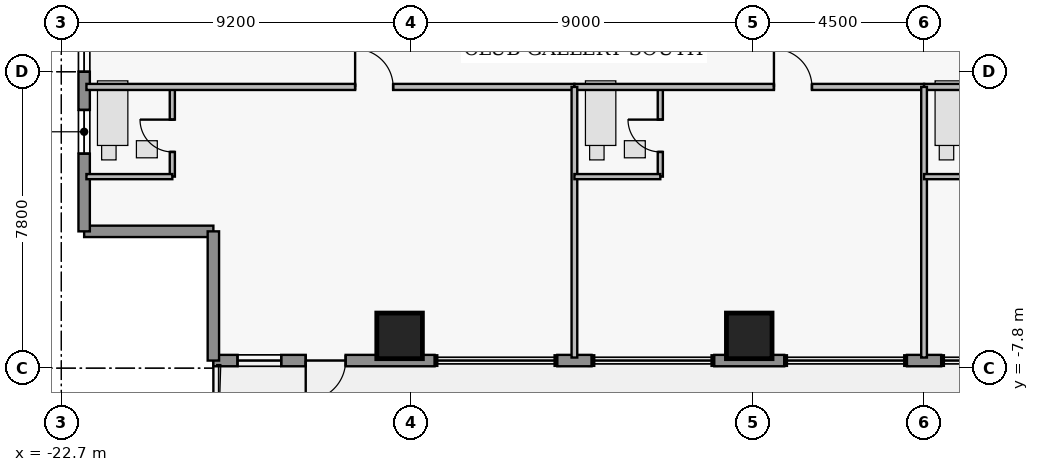
"""IFC4 building model, lengths in metres.
Left out: names, types, materials, properties, quantities, classifications, styles, units other than length and angle.
Written with IfcOpenShell. Run it as: python <this file> out.ifc"""

import sys

from ifc_helpers import new_model, si_unit, direction, frame, frame_2d, origin, origin_2d, place, context, subcontext, project, spatial, rectangle, extrude, element, fill, save


model = new_model("IFC4")
c1 = context("Model", 3, precision=1e-05, world=origin(), true_north=direction((0.0, 1.0)))
c2 = subcontext(c1, "Body", "Model", "MODEL_VIEW")
j1 = project(units=[si_unit("LENGTHUNIT", "METRE"), si_unit("PLANEANGLEUNIT", "RADIAN")], contexts=[c1])
p1 = place(None, origin())
s1 = spatial("IfcSite", under=j1, at=p1, CompositionType="ELEMENT")
p2 = place(p1, origin())
s2 = spatial("IfcBuilding", under=s1, at=p2, CompositionType="ELEMENT")
p3 = place(p2, frame((0.0, 0.0, 226.15)))
s3 = spatial("IfcBuildingStorey", under=s2, at=p3, CompositionType="ELEMENT", Elevation=226.15)
for number, where, z_axis, x_axis in (
    (1, (-13.8, -6.95, 0.0), (0.0, 0.0, 1.0), (1.0, 0.0, 0.0)),
    (2, (-4.6, -6.95, 0.0), (0.0, 0.0, 1.0), (1.0, 0.0, 0.0)),
):
    element("IfcColumn", number, at=place(p3, frame(where, z_axis=z_axis, x_axis=x_axis)), inside=s3, PredefinedType="COLUMN", context=c2, shape_type="SweptSolid", body=[
        extrude(rectangle(XDim=1.2, YDim=1.2, at=origin_2d()), origin(), (0.0, 0.0, 1.0), 3.75),
    ])
p4 = place(p3, frame((-18.7, -4.2, 0.0), z_axis=(0.0, 0.0, 1.0), x_axis=(-1.0, 0.0, 0.0)))
e3 = element("IfcWall", 3, at=p4, inside=s3, PredefinedType="STANDARD", context=c2, shape_type="SweptSolid", body=[
    extrude(rectangle(XDim=3.4, YDim=0.3, at=frame_2d((1.7, 0.0))), origin(), (0.0, 0.0, 1.0), 3.53),
])
p5 = place(p3, frame((-22.1, -4.2, 0.0), z_axis=(0.0, 0.0, 1.0), x_axis=(0.0, 1.0, 0.0)))
e4 = element("IfcWall", 4, at=p5, inside=s3, PredefinedType="STANDARD", context=c2, shape_type="SweptSolid", body=[
    extrude(rectangle(XDim=6.2, YDim=0.3, at=frame_2d((3.1, 0.0))), origin(), (0.0, 0.0, 1.0), 3.53),
])
p6 = place(p5, frame((2.045, 0.0, 0.95)))
e5 = element("IfcOpeningElement", 5, at=p6, cuts=e4, PredefinedType="OPENING", context=c2, shape_type="SweptSolid", body=[
    extrude(rectangle(XDim=1.15, YDim=1.55, at=frame_2d((0.575, 0.775))), frame((0.0, 0.16, 0.0), z_axis=(0.0, -1.0, 0.0), x_axis=(1.0, 0.0, 0.0)), (0.0, 0.0, 1.0), 0.32),
])
p7 = place(p5, frame((4.2, 0.0, 0.95)))
e6 = element("IfcOpeningElement", 6, at=p7, cuts=e4, PredefinedType="OPENING", context=c2, shape_type="SweptSolid", body=[
    extrude(rectangle(XDim=1.15, YDim=1.55, at=frame_2d((0.575, 0.775))), frame((0.0, 0.16, 0.0), z_axis=(0.0, -1.0, 0.0), x_axis=(1.0, 0.0, 0.0)), (0.0, 0.0, 1.0), 0.32),
])
p8 = place(p3, frame((0.45, -7.6, 0.0), z_axis=(0.0, 0.0, 1.0), x_axis=(-1.0, 0.0, 0.0)))
e7 = element("IfcWall", 7, at=p8, inside=s3, PredefinedType="STANDARD", context=c2, shape_type="SweptSolid", body=[
    extrude(rectangle(XDim=0.9, YDim=0.3, at=frame_2d((0.45, 0.0))), origin(), (0.0, 0.0, 1.0), 3.53),
])
p9 = place(p3, frame((-3.68, -7.6, 0.0), z_axis=(0.0, 0.0, 1.0), x_axis=(-1.0, 0.0, 0.0)))
e8 = element("IfcWall", 8, at=p9, inside=s3, PredefinedType="STANDARD", context=c2, shape_type="SweptSolid", body=[
    extrude(rectangle(XDim=1.84, YDim=0.3, at=frame_2d((0.92, 0.0))), origin(), (0.0, 0.0, 1.0), 3.53),
])
p10 = place(p3, frame((-8.75, -7.6, 0.0), z_axis=(0.0, 0.0, 1.0), x_axis=(-1.0, 0.0, 0.0)))
e9 = element("IfcWall", 9, at=p10, inside=s3, PredefinedType="STANDARD", context=c2, shape_type="SweptSolid", body=[
    extrude(rectangle(XDim=0.9, YDim=0.3, at=frame_2d((0.45, 0.0))), origin(), (0.0, 0.0, 1.0), 3.53),
])
p11 = place(p3, frame((-12.88, -7.6, 0.0), z_axis=(0.0, 0.0, 1.0), x_axis=(-1.0, 0.0, 0.0)))
e10 = element("IfcWall", 10, at=p11, inside=s3, PredefinedType="STANDARD", context=c2, shape_type="SweptSolid", body=[
    extrude(rectangle(XDim=5.82, YDim=0.3, at=frame_2d((2.91, 0.0))), origin(), (0.0, 0.0, 1.0), 3.53),
])
p12 = place(p11, frame((2.34, 0.0, 0.0)))
e11 = element("IfcOpeningElement", 11, at=p12, cuts=e10, PredefinedType="OPENING", context=c2, shape_type="SweptSolid", body=[
    extrude(rectangle(XDim=1.05, YDim=2.2, at=frame_2d((0.525, 1.1))), frame((0.0, 0.16, 0.0), z_axis=(0.0, -1.0, 0.0), x_axis=(1.0, 0.0, 0.0)), (0.0, 0.0, 1.0), 0.32),
])
p13 = place(p11, frame((4.035, 0.0, 0.95)))
e12 = element("IfcOpeningElement", 12, at=p13, cuts=e10, PredefinedType="OPENING", context=c2, shape_type="SweptSolid", body=[
    extrude(rectangle(XDim=1.15, YDim=1.55, at=frame_2d((0.575, 0.775))), frame((0.0, 0.16, 0.0), z_axis=(0.0, -1.0, 0.0), x_axis=(1.0, 0.0, 0.0)), (0.0, 0.0, 1.0), 0.32),
])
p14 = place(p3, frame((-18.7, -7.6, 0.0), z_axis=(0.0, 0.0, 1.0), x_axis=(0.0, 1.0, 0.0)))
e13 = element("IfcWall", 13, at=p14, inside=s3, PredefinedType="STANDARD", context=c2, shape_type="SweptSolid", body=[
    extrude(rectangle(XDim=3.4, YDim=0.3, at=frame_2d((1.7, 0.0))), origin(), (0.0, 0.0, 1.0), 3.53),
])
p15 = place(p3, frame((-19.78, -2.76, 0.0), z_axis=(0.0, 0.0, 1.0), x_axis=(0.0, 1.0, 0.0)))
e14 = element("IfcWall", 14, at=p15, inside=s3, PredefinedType="PLUMBINGWALL", context=c2, shape_type="SweptSolid", body=[
    extrude(rectangle(XDim=2.36, YDim=0.135, at=frame_2d((1.18, 0.0))), origin(), (0.0, 0.0, 1.0), 3.53),
])
p16 = place(p15, frame((0.65, 0.0, 0.0)))
e15 = element("IfcOpeningElement", 15, at=p16, cuts=e14, PredefinedType="OPENING", context=c2, shape_type="SweptSolid", body=[
    extrude(rectangle(XDim=0.85, YDim=2.1, at=frame_2d((0.425, 1.05))), frame((0.0, 0.077, 0.0), z_axis=(0.0, -1.0, 0.0), x_axis=(1.0, 0.0, 0.0)), (0.0, 0.0, 1.0), 0.155),
])
p17 = place(p3, frame((-22.04, -0.4, 0.0), z_axis=(0.0, 0.0, 1.0), x_axis=(1.0, 0.0, 0.0)))
e16 = element("IfcWall", 16, at=p17, inside=s3, PredefinedType="PARTITIONING", context=c2, shape_type="SweptSolid", body=[
    extrude(rectangle(XDim=12.84, YDim=0.16, at=frame_2d((6.42, 0.0))), origin(), (0.0, 0.0, 1.0), 3.53),
])
p18 = place(p17, frame((7.07, 0.0, 0.0)))
e17 = element("IfcOpeningElement", 17, at=p18, cuts=e16, PredefinedType="OPENING", context=c2, shape_type="SweptSolid", body=[
    extrude(rectangle(XDim=1.0, YDim=2.15, at=frame_2d((0.5, 1.075))), frame((0.0, 0.09, 0.0), z_axis=(0.0, -1.0, 0.0), x_axis=(1.0, 0.0, 0.0)), (0.0, 0.0, 1.0), 0.18),
])
p19 = place(p3, frame((-6.94, -2.76, 0.0), z_axis=(0.0, 0.0, 1.0), x_axis=(0.0, 1.0, 0.0)))
e18 = element("IfcWall", 18, at=p19, inside=s3, PredefinedType="PLUMBINGWALL", context=c2, shape_type="SweptSolid", body=[
    extrude(rectangle(XDim=2.36, YDim=0.135, at=frame_2d((1.18, 0.0))), origin(), (0.0, 0.0, 1.0), 3.53),
])
p20 = place(p19, frame((0.65, 0.0, 0.0)))
e19 = element("IfcOpeningElement", 19, at=p20, cuts=e18, PredefinedType="OPENING", context=c2, shape_type="SweptSolid", body=[
    extrude(rectangle(XDim=0.85, YDim=2.1, at=frame_2d((0.425, 1.05))), frame((0.0, 0.077, 0.0), z_axis=(0.0, -1.0, 0.0), x_axis=(1.0, 0.0, 0.0)), (0.0, 0.0, 1.0), 0.155),
])
p21 = place(p3, frame((-9.2, -0.4, 0.0), z_axis=(0.0, 0.0, 1.0), x_axis=(1.0, 0.0, 0.0)))
e20 = element("IfcWall", 20, at=p21, inside=s3, PredefinedType="PARTITIONING", context=c2, shape_type="SweptSolid", body=[
    extrude(rectangle(XDim=9.2, YDim=0.16, at=frame_2d((4.6, 0.0))), origin(), (0.0, 0.0, 1.0), 3.53),
])
p22 = place(p21, frame((5.25, 0.0, 0.0)))
e21 = element("IfcOpeningElement", 21, at=p22, cuts=e20, PredefinedType="OPENING", context=c2, shape_type="SweptSolid", body=[
    extrude(rectangle(XDim=1.0, YDim=2.15, at=frame_2d((0.5, 1.075))), frame((0.0, 0.09, 0.0), z_axis=(0.0, -1.0, 0.0), x_axis=(1.0, 0.0, 0.0)), (0.0, 0.0, 1.0), 0.18),
])
p23 = place(p3, frame((0.0, -0.4, 0.0), z_axis=(0.0, 0.0, 1.0), x_axis=(1.0, 0.0, 0.0)))
e22 = element("IfcWall", 22, at=p23, inside=s3, PredefinedType="PARTITIONING", context=c2, shape_type="SweptSolid", body=[
    extrude(rectangle(XDim=9.2, YDim=0.16, at=frame_2d((4.6, 0.0))), origin(), (0.0, 0.0, 1.0), 3.53),
])
p24 = place(p23, frame((5.25, 0.0, 0.0)))
e23 = element("IfcOpeningElement", 23, at=p24, cuts=e22, PredefinedType="OPENING", context=c2, shape_type="SweptSolid", body=[
    extrude(rectangle(XDim=1.0, YDim=2.15, at=frame_2d((0.5, 1.075))), frame((0.0, 0.09, 0.0), z_axis=(0.0, -1.0, 0.0), x_axis=(1.0, 0.0, 0.0)), (0.0, 0.0, 1.0), 0.18),
])
p25 = place(p3, frame((-22.04, -2.76, 0.0), z_axis=(0.0, 0.0, 1.0), x_axis=(1.0, 0.0, 0.0)))
e24 = element("IfcWall", 24, at=p25, inside=s3, PredefinedType="PLUMBINGWALL", context=c2, shape_type="SweptSolid", body=[
    extrude(rectangle(XDim=2.26, YDim=0.135, at=frame_2d((1.13, 0.0))), origin(), (0.0, 0.0, 1.0), 3.53),
])
p26 = place(p3, frame((-9.2, -7.52, 0.0), z_axis=(0.0, 0.0, 1.0), x_axis=(0.0, 1.0, 0.0)))
e25 = element("IfcWall", 25, at=p26, inside=s3, PredefinedType="PARTITIONING", context=c2, shape_type="SweptSolid", body=[
    extrude(rectangle(XDim=7.12, YDim=0.15, at=frame_2d((3.56, 0.0))), origin(), (0.0, 0.0, 1.0), 3.53),
])
p27 = place(p3, frame((-9.2, -2.76, 0.0), z_axis=(0.0, 0.0, 1.0), x_axis=(1.0, 0.0, 0.0)))
e26 = element("IfcWall", 26, at=p27, inside=s3, PredefinedType="PLUMBINGWALL", context=c2, shape_type="SweptSolid", body=[
    extrude(rectangle(XDim=2.26, YDim=0.135, at=frame_2d((1.13, 0.0))), origin(), (0.0, 0.0, 1.0), 3.124),
])
p28 = place(p3, frame((0.0, -7.52, 0.0), z_axis=(0.0, 0.0, 1.0), x_axis=(0.0, 1.0, 0.0)))
e27 = element("IfcWall", 27, at=p28, inside=s3, PredefinedType="PARTITIONING", context=c2, shape_type="SweptSolid", body=[
    extrude(rectangle(XDim=7.12, YDim=0.15, at=frame_2d((3.56, 0.0))), origin(), (0.0, 0.0, 1.0), 3.53),
])
p29 = place(p3, frame((0.0, -2.76, 0.0), z_axis=(0.0, 0.0, 1.0), x_axis=(1.0, 0.0, 0.0)))
e28 = element("IfcWall", 28, at=p29, inside=s3, PredefinedType="PLUMBINGWALL", context=c2, shape_type="SweptSolid", body=[
    extrude(rectangle(XDim=2.26, YDim=0.135, at=frame_2d((1.13, 0.0))), origin(), (0.0, 0.0, 1.0), 3.124),
])
p30 = place(p6, origin())
e29 = element("IfcWindow", 29, at=p30, inside=s3, PartitioningType="SINGLE_PANEL", PredefinedType="WINDOW", context=c2, shape_type="SweptSolid", body=[
    extrude(rectangle(XDim=1.15, YDim=1.55, at=frame_2d((0.575, 0.775))), frame((0.0, 0.03, 0.0), z_axis=(0.0, -1.0, 0.0), x_axis=(1.0, 0.0, 0.0)), (0.0, 0.0, 1.0), 0.06),
])
fill(e5, e29)
p31 = place(p7, origin())
e30 = element("IfcWindow", 30, at=p31, inside=s3, PartitioningType="SINGLE_PANEL", PredefinedType="WINDOW", context=c2, shape_type="SweptSolid", body=[
    extrude(rectangle(XDim=1.15, YDim=1.55, at=frame_2d((0.575, 0.775))), frame((0.0, 0.03, 0.0), z_axis=(0.0, -1.0, 0.0), x_axis=(1.0, 0.0, 0.0)), (0.0, 0.0, 1.0), 0.06),
])
fill(e6, e30)
p32 = place(p12, origin())
e31 = element("IfcDoor", 31, at=p32, inside=s3, OperationType="SINGLE_SWING_RIGHT", PredefinedType="DOOR", context=c2, shape_type="SweptSolid", body=[
    extrude(rectangle(XDim=1.05, YDim=2.2, at=frame_2d((0.525, 1.1))), frame((0.0, 0.025, 0.0), z_axis=(0.0, -1.0, 0.0), x_axis=(1.0, 0.0, 0.0)), (0.0, 0.0, 1.0), 0.05),
])
fill(e11, e31)
p33 = place(p13, origin())
e32 = element("IfcWindow", 32, at=p33, inside=s3, PartitioningType="SINGLE_PANEL", PredefinedType="WINDOW", context=c2, shape_type="SweptSolid", body=[
    extrude(rectangle(XDim=1.15, YDim=1.55, at=frame_2d((0.575, 0.775))), frame((0.0, 0.03, 0.0), z_axis=(0.0, -1.0, 0.0), x_axis=(1.0, 0.0, 0.0)), (0.0, 0.0, 1.0), 0.06),
])
fill(e12, e32)
p34 = place(p16, origin())
e33 = element("IfcDoor", 33, at=p34, inside=s3, OperationType="SINGLE_SWING_RIGHT", PredefinedType="DOOR", context=c2, shape_type="SweptSolid", body=[
    extrude(rectangle(XDim=0.85, YDim=2.1, at=frame_2d((0.425, 1.05))), frame((0.0, 0.025, 0.0), z_axis=(0.0, -1.0, 0.0), x_axis=(1.0, 0.0, 0.0)), (0.0, 0.0, 1.0), 0.05),
])
fill(e15, e33)
p35 = place(p18, origin())
e34 = element("IfcDoor", 34, at=p35, inside=s3, OperationType="SINGLE_SWING_LEFT", PredefinedType="DOOR", context=c2, shape_type="SweptSolid", body=[
    extrude(rectangle(XDim=1.0, YDim=2.15, at=frame_2d((0.5, 1.075))), frame((0.0, 0.025, 0.0), z_axis=(0.0, -1.0, 0.0), x_axis=(1.0, 0.0, 0.0)), (0.0, 0.0, 1.0), 0.05),
])
fill(e17, e34)
p36 = place(p20, origin())
e35 = element("IfcDoor", 35, at=p36, inside=s3, OperationType="SINGLE_SWING_RIGHT", PredefinedType="DOOR", context=c2, shape_type="SweptSolid", body=[
    extrude(rectangle(XDim=0.85, YDim=2.1, at=frame_2d((0.425, 1.05))), frame((0.0, 0.025, 0.0), z_axis=(0.0, -1.0, 0.0), x_axis=(1.0, 0.0, 0.0)), (0.0, 0.0, 1.0), 0.05),
])
fill(e19, e35)
p37 = place(p22, origin())
e36 = element("IfcDoor", 36, at=p37, inside=s3, OperationType="SINGLE_SWING_LEFT", PredefinedType="DOOR", context=c2, shape_type="SweptSolid", body=[
    extrude(rectangle(XDim=1.0, YDim=2.15, at=frame_2d((0.5, 1.075))), frame((0.0, 0.025, 0.0), z_axis=(0.0, -1.0, 0.0), x_axis=(1.0, 0.0, 0.0)), (0.0, 0.0, 1.0), 0.05),
])
fill(e21, e36)
save(model, sys.argv[1])
